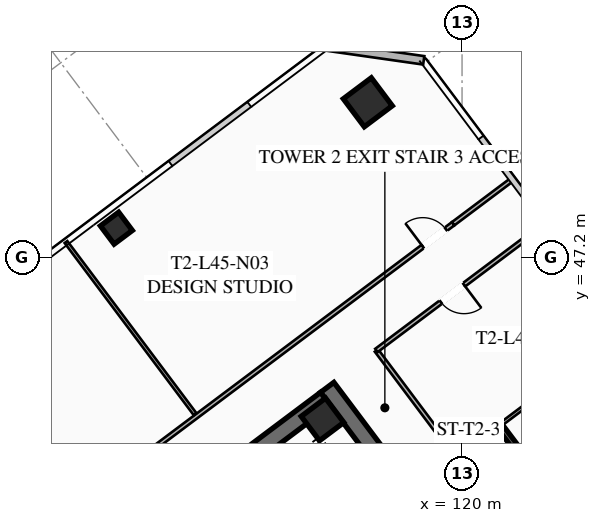
"""IFC4 building model, lengths in metres.
Left out: names, types, materials, properties, quantities, classifications, styles, units other than length and angle.
Written with IfcOpenShell. Run it as: python <this file> out.ifc"""

import sys

from ifc_helpers import new_model, si_unit, direction, frame, frame_2d, origin, origin_2d, place, context, subcontext, project, spatial, rectangle, hollow_rectangle, extrude, element, fill, save


model = new_model("IFC4")
c1 = context("Model", 3, precision=1e-05, world=origin(), true_north=direction((0.0, 1.0)))
c2 = subcontext(c1, "Body", "Model", "MODEL_VIEW")
j1 = project(units=[si_unit("LENGTHUNIT", "METRE"), si_unit("PLANEANGLEUNIT", "RADIAN")], contexts=[c1])
p1 = place(None, origin())
s1 = spatial("IfcSite", under=j1, at=p1, CompositionType="ELEMENT")
p2 = place(p1, origin())
s2 = spatial("IfcBuilding", under=s1, at=p2, CompositionType="ELEMENT")
p3 = place(p2, frame((0.0, 0.0, 167.65)))
s3 = spatial("IfcBuildingStorey", under=s2, at=p3, CompositionType="ELEMENT", Elevation=167.65)
p4 = place(p3, frame((115.564, 42.923, 0.0), z_axis=(0.0, 0.0, 1.0), x_axis=(0.600005007985, -0.799996243986, 0.0)))
e1 = element("IfcWall", 1, at=p4, inside=s3, PredefinedType="SHEAR", context=c2, shape_type="SweptSolid", body=[
    extrude(rectangle(XDim=15.6, YDim=0.55, at=frame_2d((7.8, 0.0))), origin(), (0.0, 0.0, 1.0), 3.55),
])
p5 = place(p3, frame((103.461, 33.502, 0.0), z_axis=(0.0, 0.0, 1.0), x_axis=(0.799998054672, 0.600002593761, 0.0)))
e2 = element("IfcWall", 2, at=p5, inside=s3, PredefinedType="SHEAR", context=c2, shape_type="SweptSolid", body=[
    extrude(rectangle(XDim=15.06, YDim=0.55, at=frame_2d((7.53, 0.0))), origin(), (0.0, 0.0, 1.0), 3.55),
])
p6 = place(p5, frame((4.58, 0.0, 0.0)))
e3 = element("IfcOpeningElement", 3, at=p6, cuts=e2, PredefinedType="OPENING", context=c2, shape_type="SweptSolid", body=[
    extrude(rectangle(XDim=1.25, YDim=2.25, at=frame_2d((0.625, 1.125))), frame((0.0, 0.285, 0.0), z_axis=(0.0, -1.0, 0.0), x_axis=(1.0, 0.0, 0.0)), (0.0, 0.0, 1.0), 0.57),
])
p7 = place(p5, frame((9.63, 0.0, 0.0)))
e4 = element("IfcOpeningElement", 4, at=p7, cuts=e2, PredefinedType="OPENING", context=c2, shape_type="SweptSolid", body=[
    extrude(rectangle(XDim=1.25, YDim=2.25, at=frame_2d((0.625, 1.125))), frame((0.0, 0.285, 0.0), z_axis=(0.0, -1.0, 0.0), x_axis=(1.0, 0.0, 0.0)), (0.0, 0.0, 1.0), 0.57),
])
p8 = place(p3, frame((115.41, 41.87, 0.0), z_axis=(0.0, 0.0, 1.0), x_axis=(0.799999996291, 0.600000004945, 0.0)))
e5 = element("IfcColumn", 5, at=p8, inside=s3, PredefinedType="COLUMN", context=c2, shape_type="SweptSolid", body=[
    extrude(hollow_rectangle(XDim=1.0, YDim=1.0, WallThickness=0.04, at=origin_2d()), origin(), (0.0, 0.0, 1.0), 3.37),
])
p9 = place(p3, frame((116.9, 52.3, 0.0), z_axis=(0.0, 0.0, 1.0), x_axis=(0.799999996291, 0.600000004945, 0.0)))
e6 = element("IfcColumn", 6, at=p9, inside=s3, PredefinedType="COLUMN", context=c2, shape_type="SweptSolid", body=[
    extrude(hollow_rectangle(XDim=1.15, YDim=1.15, WallThickness=0.045, at=origin_2d()), origin(), (0.0, 0.0, 1.0), 3.37),
])
p10 = place(p3, frame((108.63, 48.16, 0.0), z_axis=(0.0, 0.0, 1.0), x_axis=(0.799999996291, 0.600000004945, 0.0)))
e7 = element("IfcColumn", 7, at=p10, inside=s3, PredefinedType="COLUMN", context=c2, shape_type="SweptSolid", body=[
    extrude(hollow_rectangle(XDim=0.75, YDim=0.75, WallThickness=0.032, at=origin_2d()), origin(), (0.0, 0.0, 1.0), 3.37),
])
p11 = place(p3, frame((115.52, 54.14, 0.0), z_axis=(0.0, 0.0, 1.0), x_axis=(0.989950994782, -0.141410847992, 0.0)))
e8 = element("IfcWall", 8, at=p11, inside=s3, PredefinedType="SOLIDWALL", context=c2, shape_type="SweptSolid", body=[
    extrude(rectangle(XDim=3.253, YDim=0.28, at=frame_2d((1.626, 0.0))), origin(), (0.0, 0.0, 1.0), 3.37),
])
p12 = place(p3, frame((125.304, 36.228, 0.0), z_axis=(0.0, 0.0, 1.0), x_axis=(-0.59998851072, 0.800008616831, 0.0)))
e9 = element("IfcWall", 9, at=p12, inside=s3, PredefinedType="SHEAR", context=c2, shape_type="SweptSolid", body=[
    extrude(rectangle(XDim=6.8, YDim=0.2, at=frame_2d((3.4, 0.0))), origin(), (0.0, 0.0, 1.0), 3.37),
])
p13 = place(p3, frame((121.204, 41.528, 0.0), z_axis=(0.0, 0.0, 1.0), x_axis=(-0.800017232136, -0.599977023131, 0.0)))
e10 = element("IfcWall", 10, at=p13, inside=s3, PredefinedType="SHEAR", context=c2, shape_type="SweptSolid", body=[
    extrude(rectangle(XDim=3.4, YDim=0.2, at=frame_2d((1.7, 0.0))), origin(), (0.0, 0.0, 1.0), 3.37),
])
p14 = place(p13, frame((1.975, 0.0, 0.0)))
e11 = element("IfcOpeningElement", 11, at=p14, cuts=e10, PredefinedType="OPENING", context=c2, shape_type="SweptSolid", body=[
    extrude(rectangle(XDim=1.15, YDim=2.2, at=frame_2d((0.575, 1.1))), frame((0.0, 0.11, 0.0), z_axis=(0.0, -1.0, 0.0), x_axis=(1.0, 0.0, 0.0)), (0.0, 0.0, 1.0), 0.22),
])
p15 = place(p3, frame((119.824, 40.618, 0.0), z_axis=(0.0, 0.0, 1.0), x_axis=(-0.599982243973, 0.800013316712, 0.0)))
e12 = element("IfcWall", 12, at=p15, inside=s3, PredefinedType="PARTITIONING", context=c2, shape_type="SweptSolid", body=[
    extrude(rectangle(XDim=4.4, YDim=0.135, at=frame_2d((2.2, 0.0))), origin(), (0.0, 0.0, 1.0), 2.723),
])
p16 = place(p3, frame((96.748, 31.086, 0.0), z_axis=(0.0, 0.0, 1.0), x_axis=(0.8, 0.6, 0.0)))
e13 = element("IfcWall", 13, at=p16, inside=s3, PredefinedType="PARTITIONING", context=c2, shape_type="SweptSolid", body=[
    extrude(rectangle(XDim=28.7, YDim=0.135, at=frame_2d((14.35, 0.0))), origin(), (0.0, 0.0, 1.0), 2.723),
])
p17 = place(p16, frame((0.3, 0.0, 0.0)))
e14 = element("IfcOpeningElement", 14, at=p17, cuts=e13, PredefinedType="OPENING", context=c2, shape_type="SweptSolid", body=[
    extrude(rectangle(XDim=0.95, YDim=2.05, at=frame_2d((0.475, 1.025))), frame((0.0, 0.077, 0.0), z_axis=(0.0, -1.0, 0.0), x_axis=(1.0, 0.0, 0.0)), (0.0, 0.0, 1.0), 0.155),
])
p18 = place(p16, frame((13.999, 0.0, 0.0)))
e15 = element("IfcOpeningElement", 15, at=p18, cuts=e13, PredefinedType="OPENING", context=c2, shape_type="SweptSolid", body=[
    extrude(rectangle(XDim=0.95, YDim=2.05, at=frame_2d((0.475, 1.025))), frame((0.0, 0.077, 0.0), z_axis=(0.0, -1.0, 0.0), x_axis=(1.0, 0.0, 0.0)), (0.0, 0.0, 1.0), 0.155),
])
p19 = place(p16, frame((27.45, 0.0, 0.0)))
e16 = element("IfcOpeningElement", 16, at=p19, cuts=e13, PredefinedType="OPENING", context=c2, shape_type="SweptSolid", body=[
    extrude(rectangle(XDim=0.95, YDim=2.05, at=frame_2d((0.475, 1.025))), frame((0.0, 0.077, 0.0), z_axis=(0.0, -1.0, 0.0), x_axis=(1.0, 0.0, 0.0)), (0.0, 0.0, 1.0), 0.155),
])
p20 = place(p3, frame((119.708, 48.306, 0.0), z_axis=(0.0, 0.0, 1.0), x_axis=(0.800012055778, 0.599983925293, 0.0)))
e17 = element("IfcWall", 17, at=p20, inside=s3, PredefinedType="PARTITIONING", context=c2, shape_type="SweptSolid", body=[
    extrude(rectangle(XDim=2.43, YDim=0.135, at=frame_2d((1.215, 0.0))), origin(), (0.0, 0.0, 1.0), 2.723),
])
p21 = place(p3, frame((111.22, 42.04, 0.0), z_axis=(0.0, 0.0, 1.0), x_axis=(-0.6, 0.8, 0.0)))
e18 = element("IfcWall", 18, at=p21, inside=s3, PredefinedType="PARTITIONING", context=c2, shape_type="SweptSolid", body=[
    extrude(rectangle(XDim=7.08, YDim=0.11, at=frame_2d((3.54, 0.0))), origin(), (0.0, 0.0, 1.0), 2.723),
])
p22 = place(p3, frame((122.744, 48.308, 0.0), z_axis=(0.0, 0.0, 1.0), x_axis=(-0.79997892247, -0.600028102345, 0.0)))
e19 = element("IfcWall", 19, at=p22, inside=s3, PredefinedType="PARTITIONING", context=c2, shape_type="SweptSolid", body=[
    extrude(rectangle(XDim=6.95, YDim=0.135, at=frame_2d((3.475, 0.0))), origin(), (0.0, 0.0, 1.0), 2.723),
])
p23 = place(p22, frame((3.35, 0.0, 0.0)))
e20 = element("IfcOpeningElement", 20, at=p23, cuts=e19, PredefinedType="OPENING", context=c2, shape_type="SweptSolid", body=[
    extrude(rectangle(XDim=0.95, YDim=2.05, at=frame_2d((0.475, 1.025))), frame((0.0, 0.077, 0.0), z_axis=(0.0, -1.0, 0.0), x_axis=(1.0, 0.0, 0.0)), (0.0, 0.0, 1.0), 0.155),
])
p24 = place(p3, frame((125.384, 44.788, 0.0), z_axis=(0.0, 0.0, 1.0), x_axis=(-0.8, -0.6, 0.0)))
e21 = element("IfcWall", 21, at=p24, inside=s3, PredefinedType="PARTITIONING", context=c2, shape_type="SweptSolid", body=[
    extrude(rectangle(XDim=5.1, YDim=0.11, at=frame_2d((2.55, 0.0))), origin(), (0.0, 0.0, 1.0), 2.723),
])
p25 = place(p19, origin())
e22 = element("IfcDoor", 22, at=p25, inside=s3, OperationType="SINGLE_SWING_LEFT", PredefinedType="DOOR", context=c2, shape_type="SweptSolid", body=[
    extrude(rectangle(XDim=0.95, YDim=2.05, at=frame_2d((0.475, 1.025))), frame((0.0, 0.025, 0.0), z_axis=(0.0, -1.0, 0.0), x_axis=(1.0, 0.0, 0.0)), (0.0, 0.0, 1.0), 0.05),
])
fill(e16, e22)
p26 = place(p23, origin())
e23 = element("IfcDoor", 23, at=p26, inside=s3, OperationType="SINGLE_SWING_LEFT", PredefinedType="DOOR", context=c2, shape_type="SweptSolid", body=[
    extrude(rectangle(XDim=0.95, YDim=2.05, at=frame_2d((0.475, 1.025))), frame((0.0, 0.025, 0.0), z_axis=(0.0, -1.0, 0.0), x_axis=(1.0, 0.0, 0.0)), (0.0, 0.0, 1.0), 0.05),
])
fill(e20, e23)
save(model, sys.argv[1])
